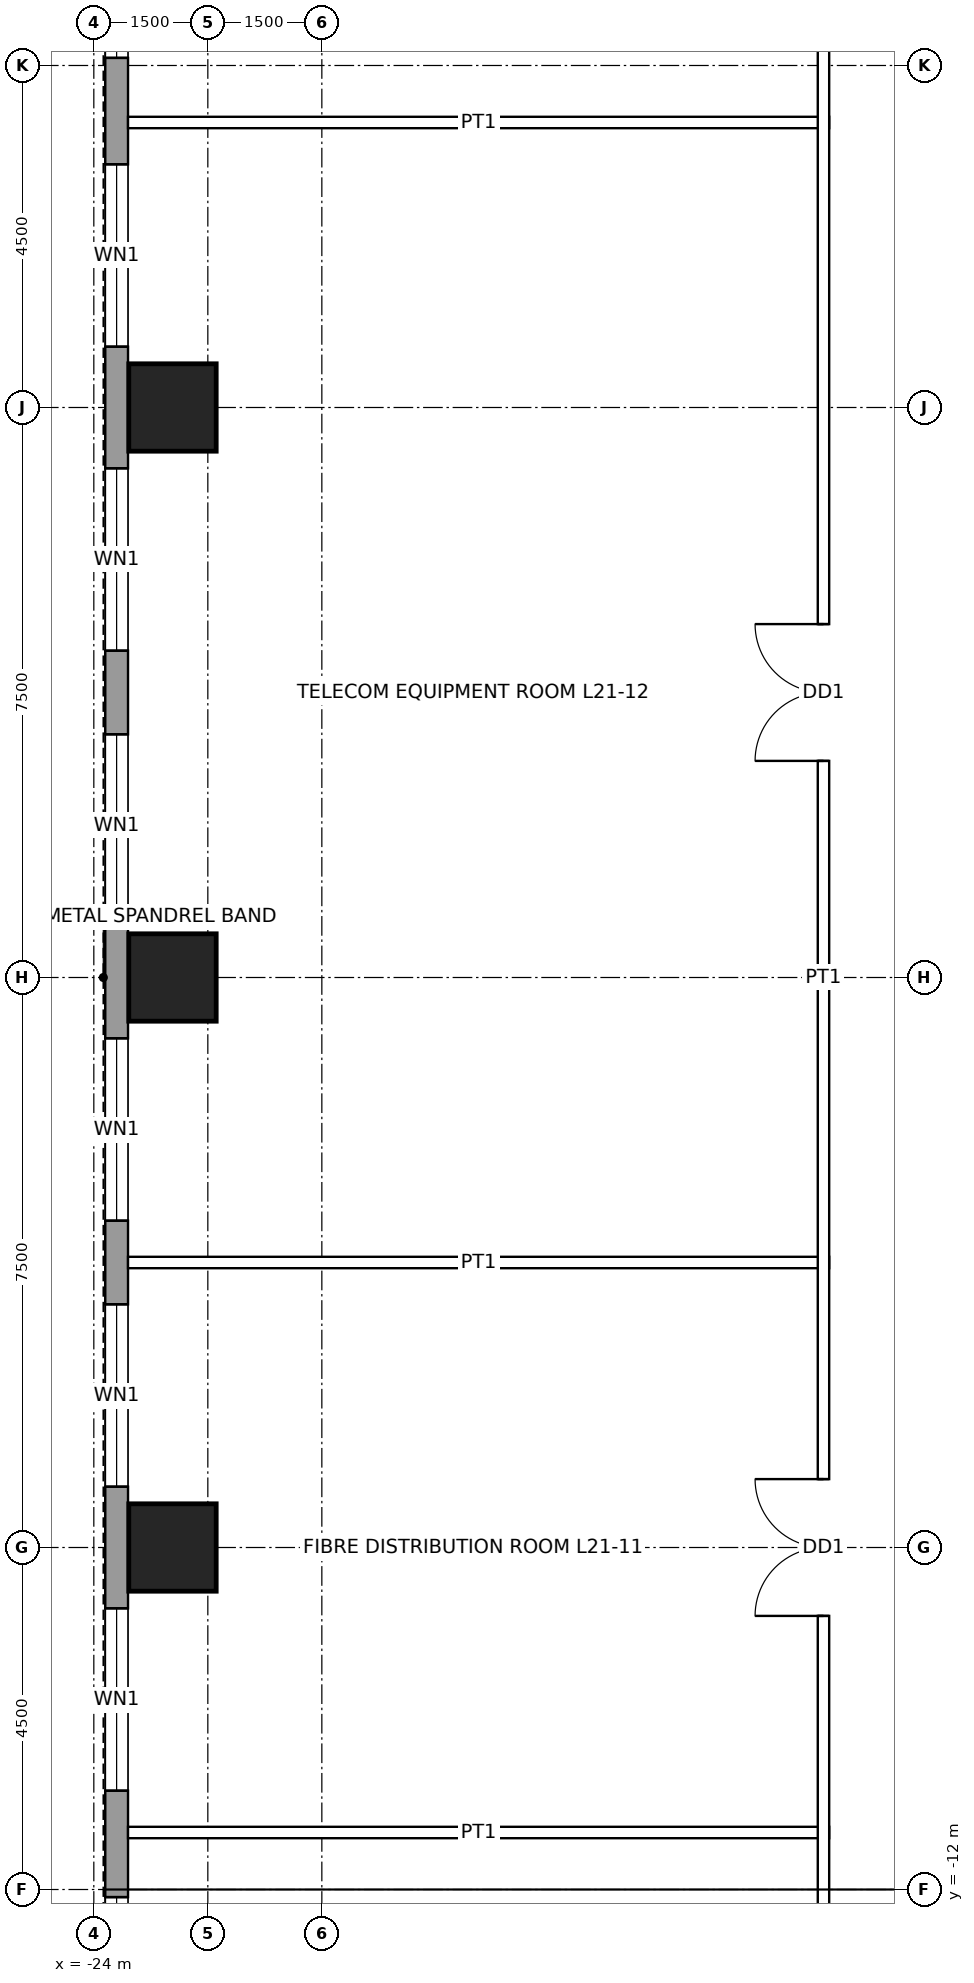
"""IFC4 building model, lengths in metres.
Left out: names, types, materials, properties, quantities, classifications, styles, units other than length and angle.
Written with IfcOpenShell. Run it as: python <this file> out.ifc"""

import sys

from ifc_helpers import new_model, si_unit, direction, frame, frame_2d, origin, origin_2d, place, context, subcontext, project, spatial, rectangle, hollow_rectangle, extrude, element, fill, save


model = new_model("IFC4")
c1 = context("Model", 3, precision=1e-05, world=origin(), true_north=direction((0.0, 1.0)))
c2 = subcontext(c1, "Body", "Model", "MODEL_VIEW")
j1 = project(units=[si_unit("LENGTHUNIT", "METRE"), si_unit("PLANEANGLEUNIT", "RADIAN")], contexts=[c1])
p1 = place(None, origin())
s1 = spatial("IfcSite", under=j1, at=p1, CompositionType="ELEMENT")
p2 = place(p1, origin())
s2 = spatial("IfcBuilding", under=s1, at=p2, CompositionType="ELEMENT")
p3 = place(p2, frame((0.0, 0.0, 108.9)))
s3 = spatial("IfcBuildingStorey", under=s2, at=p3, CompositionType="ELEMENT", Elevation=108.9)
for number, where, z_axis, x_axis in (
    (1, (-22.965, -7.5, 0.0), (0.0, 0.0, 1.0), (1.0, 0.0, 0.0)),
    (2, (-22.965, 0.0, 0.0), (0.0, 0.0, 1.0), (1.0, 0.0, 0.0)),
    (3, (-22.965, 7.5, 0.0), (0.0, 0.0, 1.0), (1.0, 0.0, 0.0)),
):
    element("IfcColumn", number, at=place(p3, frame(where, z_axis=z_axis, x_axis=x_axis)), inside=s3, PredefinedType="COLUMN", context=c2, shape_type="SweptSolid", body=[
        extrude(hollow_rectangle(XDim=1.15, YDim=1.15, WallThickness=0.075, at=origin_2d()), origin(), (0.0, 0.0, 1.0), 4.5),
    ])
p4 = place(p3, frame((-23.7, -16.2, 0.0), z_axis=(0.0, 0.0, 1.0), x_axis=(0.0, 1.0, 0.0)))
e4 = element("IfcWall", 4, at=p4, inside=s3, PredefinedType="SOLIDWALL", context=c2, shape_type="SweptSolid", body=[
    extrude(rectangle(XDim=32.4, YDim=0.3, at=frame_2d((16.2, 0.0))), origin(), (0.0, 0.0, 1.0), 4.3),
])
p5 = place(p4, frame((2.3, 0.0, 1.0)))
e5 = element("IfcOpeningElement", 5, at=p5, cuts=e4, PredefinedType="OPENING", context=c2, shape_type="SweptSolid", body=[
    extrude(rectangle(XDim=1.8, YDim=1.2, at=frame_2d((0.9, 0.6))), frame((0.0, 0.16, 0.0), z_axis=(0.0, -1.0, 0.0), x_axis=(1.0, 0.0, 0.0)), (0.0, 0.0, 1.0), 0.32),
])
p6 = place(p4, frame((5.5, 0.0, 1.0)))
e6 = element("IfcOpeningElement", 6, at=p6, cuts=e4, PredefinedType="OPENING", context=c2, shape_type="SweptSolid", body=[
    extrude(rectangle(XDim=2.4, YDim=1.2, at=frame_2d((1.2, 0.6))), frame((0.0, 0.16, 0.0), z_axis=(0.0, -1.0, 0.0), x_axis=(1.0, 0.0, 0.0)), (0.0, 0.0, 1.0), 0.32),
])
p7 = place(p4, frame((9.5, 0.0, 1.0)))
e7 = element("IfcOpeningElement", 7, at=p7, cuts=e4, PredefinedType="OPENING", context=c2, shape_type="SweptSolid", body=[
    extrude(rectangle(XDim=2.4, YDim=1.2, at=frame_2d((1.2, 0.6))), frame((0.0, 0.16, 0.0), z_axis=(0.0, -1.0, 0.0), x_axis=(1.0, 0.0, 0.0)), (0.0, 0.0, 1.0), 0.32),
])
p8 = place(p4, frame((13.0, 0.0, 1.0)))
e8 = element("IfcOpeningElement", 8, at=p8, cuts=e4, PredefinedType="OPENING", context=c2, shape_type="SweptSolid", body=[
    extrude(rectangle(XDim=2.4, YDim=1.2, at=frame_2d((1.2, 0.6))), frame((0.0, 0.16, 0.0), z_axis=(0.0, -1.0, 0.0), x_axis=(1.0, 0.0, 0.0)), (0.0, 0.0, 1.0), 0.32),
])
p9 = place(p4, frame((17.0, 0.0, 1.0)))
e9 = element("IfcOpeningElement", 9, at=p9, cuts=e4, PredefinedType="OPENING", context=c2, shape_type="SweptSolid", body=[
    extrude(rectangle(XDim=2.4, YDim=1.2, at=frame_2d((1.2, 0.6))), frame((0.0, 0.16, 0.0), z_axis=(0.0, -1.0, 0.0), x_axis=(1.0, 0.0, 0.0)), (0.0, 0.0, 1.0), 0.32),
])
p10 = place(p4, frame((20.5, 0.0, 1.0)))
e10 = element("IfcOpeningElement", 10, at=p10, cuts=e4, PredefinedType="OPENING", context=c2, shape_type="SweptSolid", body=[
    extrude(rectangle(XDim=2.4, YDim=1.2, at=frame_2d((1.2, 0.6))), frame((0.0, 0.16, 0.0), z_axis=(0.0, -1.0, 0.0), x_axis=(1.0, 0.0, 0.0)), (0.0, 0.0, 1.0), 0.32),
])
p11 = place(p4, frame((24.5, 0.0, 1.0)))
e11 = element("IfcOpeningElement", 11, at=p11, cuts=e4, PredefinedType="OPENING", context=c2, shape_type="SweptSolid", body=[
    extrude(rectangle(XDim=2.4, YDim=1.2, at=frame_2d((1.2, 0.6))), frame((0.0, 0.16, 0.0), z_axis=(0.0, -1.0, 0.0), x_axis=(1.0, 0.0, 0.0)), (0.0, 0.0, 1.0), 0.32),
])
p12 = place(p4, frame((28.3, 0.0, 1.0)))
e12 = element("IfcOpeningElement", 12, at=p12, cuts=e4, PredefinedType="OPENING", context=c2, shape_type="SweptSolid", body=[
    extrude(rectangle(XDim=1.8, YDim=1.2, at=frame_2d((0.9, 0.6))), frame((0.0, 0.16, 0.0), z_axis=(0.0, -1.0, 0.0), x_axis=(1.0, 0.0, 0.0)), (0.0, 0.0, 1.0), 0.32),
])
for number, where, z_axis, x_axis in (
    (13, (-23.55, -11.25, 0.0), (0.0, 0.0, 1.0), (1.0, 0.0, 0.0)),
    (14, (-23.55, -3.75, 0.0), (0.0, 0.0, 1.0), (1.0, 0.0, 0.0)),
    (15, (-23.55, 11.25, 0.0), (0.0, 0.0, 1.0), (1.0, 0.0, 0.0)),
):
    element("IfcWall", number, at=place(p3, frame(where, z_axis=z_axis, x_axis=x_axis)), inside=s3, PredefinedType="PARTITIONING", context=c2, shape_type="SweptSolid", body=[
        extrude(rectangle(XDim=9.225, YDim=0.15, at=frame_2d((4.613, 0.0))), origin(), (0.0, 0.0, 1.0), 3.431),
    ])
p13 = place(p3, frame((-14.4, -14.475, 0.0), z_axis=(0.0, 0.0, 1.0), x_axis=(0.0, 1.0, 0.0)))
e16 = element("IfcWall", 16, at=p13, inside=s3, PredefinedType="PARTITIONING", context=c2, shape_type="SweptSolid", body=[
    extrude(rectangle(XDim=28.95, YDim=0.15, at=frame_2d((14.475, 0.0))), origin(), (0.0, 0.0, 1.0), 4.3),
])
p14 = place(p13, frame((6.075, 0.0, 0.0)))
e17 = element("IfcOpeningElement", 17, at=p14, cuts=e16, PredefinedType="OPENING", context=c2, shape_type="SweptSolid", body=[
    extrude(rectangle(XDim=1.8, YDim=2.4, at=frame_2d((0.9, 1.2))), frame((0.0, 0.085, 0.0), z_axis=(0.0, -1.0, 0.0), x_axis=(1.0, 0.0, 0.0)), (0.0, 0.0, 1.0), 0.17),
])
p15 = place(p13, frame((17.325, 0.0, 0.0)))
e18 = element("IfcOpeningElement", 18, at=p15, cuts=e16, PredefinedType="OPENING", context=c2, shape_type="SweptSolid", body=[
    extrude(rectangle(XDim=1.8, YDim=2.4, at=frame_2d((0.9, 1.2))), frame((0.0, 0.085, 0.0), z_axis=(0.0, -1.0, 0.0), x_axis=(1.0, 0.0, 0.0)), (0.0, 0.0, 1.0), 0.17),
])
p16 = place(p5, origin())
e19 = element("IfcWindow", 19, at=p16, inside=s3, PartitioningType="SINGLE_PANEL", PredefinedType="WINDOW", context=c2, shape_type="SweptSolid", body=[
    extrude(rectangle(XDim=1.8, YDim=1.2, at=frame_2d((0.9, 0.6))), frame((0.0, 0.03, 0.0), z_axis=(0.0, -1.0, 0.0), x_axis=(1.0, 0.0, 0.0)), (0.0, 0.0, 1.0), 0.06),
])
fill(e5, e19)
p17 = place(p6, origin())
e20 = element("IfcWindow", 20, at=p17, inside=s3, PartitioningType="SINGLE_PANEL", PredefinedType="WINDOW", context=c2, shape_type="SweptSolid", body=[
    extrude(rectangle(XDim=2.4, YDim=1.2, at=frame_2d((1.2, 0.6))), frame((0.0, 0.03, 0.0), z_axis=(0.0, -1.0, 0.0), x_axis=(1.0, 0.0, 0.0)), (0.0, 0.0, 1.0), 0.06),
])
fill(e6, e20)
p18 = place(p7, origin())
e21 = element("IfcWindow", 21, at=p18, inside=s3, PartitioningType="SINGLE_PANEL", PredefinedType="WINDOW", context=c2, shape_type="SweptSolid", body=[
    extrude(rectangle(XDim=2.4, YDim=1.2, at=frame_2d((1.2, 0.6))), frame((0.0, 0.03, 0.0), z_axis=(0.0, -1.0, 0.0), x_axis=(1.0, 0.0, 0.0)), (0.0, 0.0, 1.0), 0.06),
])
fill(e7, e21)
p19 = place(p8, origin())
e22 = element("IfcWindow", 22, at=p19, inside=s3, PartitioningType="SINGLE_PANEL", PredefinedType="WINDOW", context=c2, shape_type="SweptSolid", body=[
    extrude(rectangle(XDim=2.4, YDim=1.2, at=frame_2d((1.2, 0.6))), frame((0.0, 0.03, 0.0), z_axis=(0.0, -1.0, 0.0), x_axis=(1.0, 0.0, 0.0)), (0.0, 0.0, 1.0), 0.06),
])
fill(e8, e22)
p20 = place(p9, origin())
e23 = element("IfcWindow", 23, at=p20, inside=s3, PartitioningType="SINGLE_PANEL", PredefinedType="WINDOW", context=c2, shape_type="SweptSolid", body=[
    extrude(rectangle(XDim=2.4, YDim=1.2, at=frame_2d((1.2, 0.6))), frame((0.0, 0.03, 0.0), z_axis=(0.0, -1.0, 0.0), x_axis=(1.0, 0.0, 0.0)), (0.0, 0.0, 1.0), 0.06),
])
fill(e9, e23)
p21 = place(p10, origin())
e24 = element("IfcWindow", 24, at=p21, inside=s3, PartitioningType="SINGLE_PANEL", PredefinedType="WINDOW", context=c2, shape_type="SweptSolid", body=[
    extrude(rectangle(XDim=2.4, YDim=1.2, at=frame_2d((1.2, 0.6))), frame((0.0, 0.03, 0.0), z_axis=(0.0, -1.0, 0.0), x_axis=(1.0, 0.0, 0.0)), (0.0, 0.0, 1.0), 0.06),
])
fill(e10, e24)
p22 = place(p11, origin())
e25 = element("IfcWindow", 25, at=p22, inside=s3, PartitioningType="SINGLE_PANEL", PredefinedType="WINDOW", context=c2, shape_type="SweptSolid", body=[
    extrude(rectangle(XDim=2.4, YDim=1.2, at=frame_2d((1.2, 0.6))), frame((0.0, 0.03, 0.0), z_axis=(0.0, -1.0, 0.0), x_axis=(1.0, 0.0, 0.0)), (0.0, 0.0, 1.0), 0.06),
])
fill(e11, e25)
p23 = place(p12, origin())
e26 = element("IfcWindow", 26, at=p23, inside=s3, PartitioningType="SINGLE_PANEL", PredefinedType="WINDOW", context=c2, shape_type="SweptSolid", body=[
    extrude(rectangle(XDim=1.8, YDim=1.2, at=frame_2d((0.9, 0.6))), frame((0.0, 0.03, 0.0), z_axis=(0.0, -1.0, 0.0), x_axis=(1.0, 0.0, 0.0)), (0.0, 0.0, 1.0), 0.06),
])
fill(e12, e26)
p24 = place(p14, origin())
e27 = element("IfcDoor", 27, at=p24, inside=s3, OperationType="DOUBLE_DOOR_SINGLE_SWING", PredefinedType="DOOR", context=c2, shape_type="SweptSolid", body=[
    extrude(rectangle(XDim=1.8, YDim=2.4, at=frame_2d((0.9, 1.2))), frame((0.0, 0.025, 0.0), z_axis=(0.0, -1.0, 0.0), x_axis=(1.0, 0.0, 0.0)), (0.0, 0.0, 1.0), 0.05),
])
fill(e17, e27)
p25 = place(p15, origin())
e28 = element("IfcDoor", 28, at=p25, inside=s3, OperationType="DOUBLE_DOOR_SINGLE_SWING", PredefinedType="DOOR", context=c2, shape_type="SweptSolid", body=[
    extrude(rectangle(XDim=1.8, YDim=2.4, at=frame_2d((0.9, 1.2))), frame((0.0, 0.025, 0.0), z_axis=(0.0, -1.0, 0.0), x_axis=(1.0, 0.0, 0.0)), (0.0, 0.0, 1.0), 0.05),
])
fill(e18, e28)
save(model, sys.argv[1])
